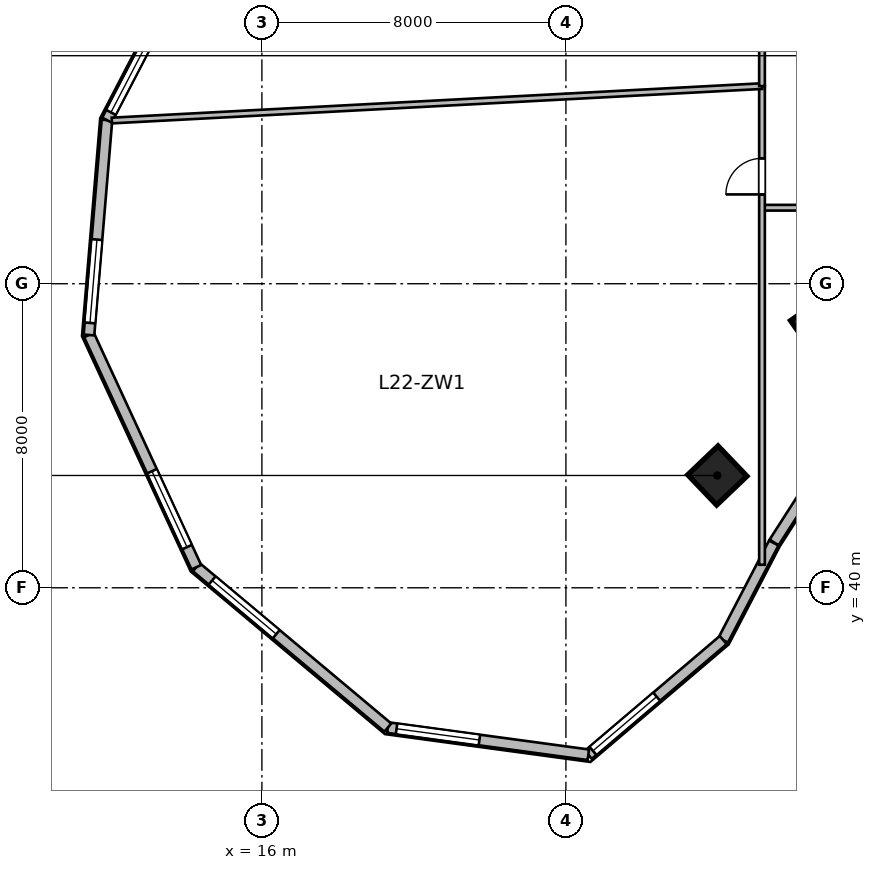
"""IFC4 building model, lengths in metres.
Left out: names, types, materials, properties, quantities, classifications, styles, units other than length and angle.
Written with IfcOpenShell. Run it as: python <this file> out.ifc"""

import sys

from ifc_helpers import new_model, si_unit, direction, frame, frame_2d, origin, origin_2d, place, context, subcontext, project, spatial, rectangle, extrude, source, transform, mapped, element, fill, save


model = new_model("IFC4")
c1 = context("Model", 3, precision=1e-05, world=origin(), true_north=direction((0.0, 1.0)))
c2 = subcontext(c1, "Body", "Model", "MODEL_VIEW")
j1 = project(units=[si_unit("LENGTHUNIT", "METRE"), si_unit("PLANEANGLEUNIT", "RADIAN")], contexts=[c1])
p1 = place(None, origin())
s1 = spatial("IfcSite", under=j1, at=p1, CompositionType="ELEMENT")
p2 = place(p1, origin())
s2 = spatial("IfcBuilding", under=s1, at=p2, CompositionType="ELEMENT")
p3 = place(p2, frame((0.0, 0.0, 96.0)))
s3 = spatial("IfcBuildingStorey", under=s2, at=p3, CompositionType="ELEMENT", Elevation=96.0)
m1 = source(origin(), c2, "Body", "SweptSolid", [
    extrude(rectangle(XDim=1.1, YDim=1.1, at=origin_2d()), origin(), (0.0, 0.0, 1.0), 3.9),
])
for number, where, z_axis, x_axis in (
    (1, (27.985, 42.955, 0.0), (0.0, 0.0, 1.0), (-0.691, 0.723, 0.0)),
    (2, (30.677, 46.892, 0.0), (0.0, 0.0, 1.0), (-0.571, 0.821, 0.0)),
):
    element("IfcColumn", number, at=place(p3, frame(where, z_axis=z_axis, x_axis=x_axis)), inside=s3, PredefinedType="COLUMN", context=c2, shape_type="MappedRepresentation", body=[
        mapped(m1, transform((0.0, 0.0, 0.0), scale=1.0)),
    ])
m2 = source(origin(), c2, "Body", "SweptSolid", [
    extrude(rectangle(XDim=2.84, YDim=0.28, at=frame_2d((1.42, 0.0))), origin(), (0.0, 0.0, 1.0), 3.65),
])
p4 = place(p3, frame((31.011, 43.582, 0.0), z_axis=(0.0, 0.0, 1.0), x_axis=(-0.540214368057, -0.841527442538, 0.0)))
e3 = element("IfcWall", 3, at=p4, inside=s3, PredefinedType="SOLIDWALL", context=c2, shape_type="MappedRepresentation", body=[
    mapped(m2, transform((0.0, 0.0, 0.0), scale=1.0)),
])
m3 = source(origin(), c2, "Body", "SweptSolid", [
    extrude(rectangle(XDim=2.88, YDim=0.28, at=frame_2d((1.44, 0.0))), origin(), (0.0, 0.0, 1.0), 3.65),
])
p5 = place(p3, frame((29.469, 41.178, 0.0), z_axis=(0.0, 0.0, 1.0), x_axis=(-0.461769086658, -0.887000175088, 0.0)))
e4 = element("IfcWall", 4, at=p5, inside=s3, PredefinedType="SOLIDWALL", context=c2, shape_type="MappedRepresentation", body=[
    mapped(m3, transform((0.0, 0.0, 0.0), scale=1.0)),
])
m4 = source(origin(), c2, "Body", "SweptSolid", [
    extrude(rectangle(XDim=4.659, YDim=0.28, at=frame_2d((2.33, 0.0))), origin(), (0.0, 0.0, 1.0), 3.65),
])
p6 = place(p3, frame((28.139, 38.624, 0.0), z_axis=(0.0, 0.0, 1.0), x_axis=(-0.761913458795, -0.647678841176, 0.0)))
e5 = element("IfcWall", 5, at=p6, inside=s3, PredefinedType="SOLIDWALL", context=c2, shape_type="MappedRepresentation", body=[
    mapped(m4, transform((0.0, 0.0, 0.0), scale=1.0)),
])
p7 = place(p6, frame((2.299, 0.0, 0.95)))
e6 = element("IfcOpeningElement", 6, at=p7, cuts=e5, PredefinedType="OPENING", context=c2, shape_type="SweptSolid", body=[
    extrude(rectangle(XDim=2.2, YDim=2.1, at=frame_2d((1.1, 1.05))), frame((0.0, 0.15, 0.0), z_axis=(0.0, -1.0, 0.0), x_axis=(1.0, 0.0, 0.0)), (0.0, 0.0, 1.0), 0.3),
])
m5 = source(origin(), c2, "Body", "SweptSolid", [
    extrude(rectangle(XDim=5.324, YDim=0.28, at=frame_2d((2.662, 0.0))), origin(), (0.0, 0.0, 1.0), 3.65),
])
p8 = place(p3, frame((24.59, 35.606, 0.0), z_axis=(0.0, 0.0, 1.0), x_axis=(-0.990931467223, 0.134368252451, 0.0)))
e7 = element("IfcWall", 7, at=p8, inside=s3, PredefinedType="SOLIDWALL", context=c2, shape_type="MappedRepresentation", body=[
    mapped(m5, transform((0.0, 0.0, 0.0), scale=1.0)),
])
p9 = place(p8, frame((2.893, 0.0, 0.95)))
e8 = element("IfcOpeningElement", 8, at=p9, cuts=e7, PredefinedType="OPENING", context=c2, shape_type="SweptSolid", body=[
    extrude(rectangle(XDim=2.2, YDim=2.1, at=frame_2d((1.1, 1.05))), frame((0.0, 0.15, 0.0), z_axis=(0.0, -1.0, 0.0), x_axis=(1.0, 0.0, 0.0)), (0.0, 0.0, 1.0), 0.3),
])
m6 = source(origin(), c2, "Body", "SweptSolid", [
    extrude(rectangle(XDim=6.573, YDim=0.28, at=frame_2d((3.287, 0.0))), origin(), (0.0, 0.0, 1.0), 3.65),
])
p10 = place(p3, frame((19.314, 36.322, 0.0), z_axis=(0.0, 0.0, 1.0), x_axis=(-0.766715154163, 0.641987439423, 0.0)))
e9 = element("IfcWall", 9, at=p10, inside=s3, PredefinedType="SOLIDWALL", context=c2, shape_type="MappedRepresentation", body=[
    mapped(m6, transform((0.0, 0.0, 0.0), scale=1.0)),
])
p11 = place(p10, frame((3.83, 0.0, 0.95)))
e10 = element("IfcOpeningElement", 10, at=p11, cuts=e9, PredefinedType="OPENING", context=c2, shape_type="SweptSolid", body=[
    extrude(rectangle(XDim=2.2, YDim=2.1, at=frame_2d((1.1, 1.05))), frame((0.0, 0.15, 0.0), z_axis=(0.0, -1.0, 0.0), x_axis=(1.0, 0.0, 0.0)), (0.0, 0.0, 1.0), 0.3),
])
m7 = source(origin(), c2, "Body", "SweptSolid", [
    extrude(rectangle(XDim=6.732, YDim=0.28, at=frame_2d((3.366, 0.0))), origin(), (0.0, 0.0, 1.0), 3.65),
])
p12 = place(p3, frame((14.275, 40.541, 0.0), z_axis=(0.0, 0.0, 1.0), x_axis=(-0.419644552709, 0.907688520023, 0.0)))
e11 = element("IfcWall", 11, at=p12, inside=s3, PredefinedType="SOLIDWALL", context=c2, shape_type="MappedRepresentation", body=[
    mapped(m7, transform((0.0, 0.0, 0.0), scale=1.0)),
])
p13 = place(p12, frame((0.583, 0.0, 0.95)))
e12 = element("IfcOpeningElement", 12, at=p13, cuts=e11, PredefinedType="OPENING", context=c2, shape_type="SweptSolid", body=[
    extrude(rectangle(XDim=2.2, YDim=2.1, at=frame_2d((1.1, 1.05))), frame((0.0, 0.15, 0.0), z_axis=(0.0, -1.0, 0.0), x_axis=(1.0, 0.0, 0.0)), (0.0, 0.0, 1.0), 0.3),
])
m8 = source(origin(), c2, "Body", "SweptSolid", [
    extrude(rectangle(XDim=5.674, YDim=0.28, at=frame_2d((2.837, 0.0))), origin(), (0.0, 0.0, 1.0), 3.65),
])
p14 = place(p3, frame((11.45, 46.652, 0.0), z_axis=(0.0, 0.0, 1.0), x_axis=(0.083309007867, 0.996523762491, 0.0)))
e13 = element("IfcWall", 13, at=p14, inside=s3, PredefinedType="SOLIDWALL", context=c2, shape_type="MappedRepresentation", body=[
    mapped(m8, transform((0.0, 0.0, 0.0), scale=1.0)),
])
p15 = place(p14, frame((0.318, 0.0, 0.95)))
e14 = element("IfcOpeningElement", 14, at=p15, cuts=e13, PredefinedType="OPENING", context=c2, shape_type="SweptSolid", body=[
    extrude(rectangle(XDim=2.2, YDim=2.1, at=frame_2d((1.1, 1.05))), frame((0.0, 0.15, 0.0), z_axis=(0.0, -1.0, 0.0), x_axis=(1.0, 0.0, 0.0)), (0.0, 0.0, 1.0), 0.3),
])
m9 = source(origin(), c2, "Body", "SweptSolid", [
    extrude(rectangle(XDim=5.315, YDim=0.28, at=frame_2d((2.658, 0.0))), origin(), (0.0, 0.0, 1.0), 3.65),
])
p16 = place(p3, frame((11.922, 52.305, 0.0), z_axis=(0.0, 0.0, 1.0), x_axis=(0.461760527822, 0.887004630735, 0.0)))
e15 = element("IfcWall", 15, at=p16, inside=s3, PredefinedType="SOLIDWALL", context=c2, shape_type="MappedRepresentation", body=[
    mapped(m9, transform((0.0, 0.0, 0.0), scale=1.0)),
])
p17 = place(p16, frame((0.229, 0.0, 0.95)))
e16 = element("IfcOpeningElement", 16, at=p17, cuts=e15, PredefinedType="OPENING", context=c2, shape_type="SweptSolid", body=[
    extrude(rectangle(XDim=2.2, YDim=2.1, at=frame_2d((1.1, 1.05))), frame((0.0, 0.15, 0.0), z_axis=(0.0, -1.0, 0.0), x_axis=(1.0, 0.0, 0.0)), (0.0, 0.0, 1.0), 0.3),
])
m10 = source(origin(), c2, "Body", "SweptSolid", [
    extrude(rectangle(XDim=2.5, YDim=0.15, at=frame_2d((1.25, 0.0))), origin(), (0.0, 0.0, 1.0), 3.65),
])
p18 = place(p3, frame((29.2, 50.0, 0.0), z_axis=(0.0, 0.0, 1.0), x_axis=(1.0, 0.0, 0.0)))
e17 = element("IfcWall", 17, at=p18, inside=s3, PredefinedType="PARTITIONING", context=c2, shape_type="MappedRepresentation", body=[
    mapped(m10, transform((0.0, 0.0, 0.0), scale=1.0)),
])
m11 = source(origin(), c2, "Body", "SweptSolid", [
    extrude(rectangle(XDim=12.594, YDim=0.15, at=frame_2d((6.297, 0.0))), origin(), (0.0, 0.0, 1.0), 2.942),
])
p19 = place(p3, frame((29.16, 40.606, 0.0), z_axis=(0.0, 0.0, 1.0), x_axis=(0.0, 1.0, 0.0)))
e18 = element("IfcWall", 18, at=p19, inside=s3, PredefinedType="PARTITIONING", context=c2, shape_type="MappedRepresentation", body=[
    mapped(m11, transform((0.0, 0.0, 0.0), scale=1.0)),
])
p20 = place(p19, frame((9.744, 0.0, 0.0)))
e19 = element("IfcOpeningElement", 19, at=p20, cuts=e18, PredefinedType="OPENING", context=c2, shape_type="SweptSolid", body=[
    extrude(rectangle(XDim=0.95, YDim=2.1, at=frame_2d((0.475, 1.05))), frame((0.0, 0.085, 0.0), z_axis=(0.0, -1.0, 0.0), x_axis=(1.0, 0.0, 0.0)), (0.0, 0.0, 1.0), 0.17),
])
m12 = source(origin(), c2, "Body", "SweptSolid", [
    extrude(rectangle(XDim=17.132, YDim=0.15, at=frame_2d((8.566, 0.0))), origin(), (0.0, 0.0, 1.0), 3.65),
])
p21 = place(p3, frame((12.052, 52.294, 0.0), z_axis=(0.0, 0.0, 1.0), x_axis=(0.998601444231, 0.05286923094, 0.0)))
e20 = element("IfcWall", 20, at=p21, inside=s3, PredefinedType="PARTITIONING", context=c2, shape_type="MappedRepresentation", body=[
    mapped(m12, transform((0.0, 0.0, 0.0), scale=1.0)),
])
m13 = source(origin(), c2, "Body", "SweptSolid", [
    extrude(rectangle(XDim=5.4, YDim=0.15, at=frame_2d((2.7, 0.0))), origin(), (0.0, 0.0, 1.0), 3.022),
])
p22 = place(p3, frame((29.16, 53.2, 0.0), z_axis=(0.0, 0.0, 1.0), x_axis=(0.0, 1.0, 0.0)))
e21 = element("IfcWall", 21, at=p22, inside=s3, PredefinedType="PARTITIONING", context=c2, shape_type="MappedRepresentation", body=[
    mapped(m13, transform((0.0, 0.0, 0.0), scale=1.0)),
])
p23 = place(p22, frame((2.225, 0.0, 0.0)))
e22 = element("IfcOpeningElement", 22, at=p23, cuts=e21, PredefinedType="OPENING", context=c2, shape_type="SweptSolid", body=[
    extrude(rectangle(XDim=0.95, YDim=2.1, at=frame_2d((0.475, 1.05))), frame((0.0, 0.085, 0.0), z_axis=(0.0, -1.0, 0.0), x_axis=(1.0, 0.0, 0.0)), (0.0, 0.0, 1.0), 0.17),
])
m14 = source(origin(), c2, "Body", "SweptSolid", [
    extrude(rectangle(XDim=2.2, YDim=2.1, at=frame_2d((1.1, 1.05))), frame((0.0, 0.03, 0.0), z_axis=(0.0, -1.0, 0.0), x_axis=(1.0, 0.0, 0.0)), (0.0, 0.0, 1.0), 0.06),
])
p24 = place(p7, origin())
e23 = element("IfcWindow", 23, at=p24, inside=s3, PartitioningType="TRIPLE_PANEL_VERTICAL", PredefinedType="WINDOW", context=c2, shape_type="MappedRepresentation", body=[
    mapped(m14, transform((0.0, 0.0, 0.0), scale=1.0)),
])
fill(e6, e23)
p25 = place(p9, origin())
e24 = element("IfcWindow", 24, at=p25, inside=s3, PartitioningType="TRIPLE_PANEL_VERTICAL", PredefinedType="WINDOW", context=c2, shape_type="MappedRepresentation", body=[
    mapped(m14, transform((0.0, 0.0, 0.0), scale=1.0)),
])
fill(e8, e24)
p26 = place(p11, origin())
e25 = element("IfcWindow", 25, at=p26, inside=s3, PartitioningType="TRIPLE_PANEL_VERTICAL", PredefinedType="WINDOW", context=c2, shape_type="MappedRepresentation", body=[
    mapped(m14, transform((0.0, 0.0, 0.0), scale=1.0)),
])
fill(e10, e25)
p27 = place(p13, origin())
e26 = element("IfcWindow", 26, at=p27, inside=s3, PartitioningType="TRIPLE_PANEL_VERTICAL", PredefinedType="WINDOW", context=c2, shape_type="MappedRepresentation", body=[
    mapped(m14, transform((0.0, 0.0, 0.0), scale=1.0)),
])
fill(e12, e26)
p28 = place(p15, origin())
e27 = element("IfcWindow", 27, at=p28, inside=s3, PartitioningType="TRIPLE_PANEL_VERTICAL", PredefinedType="WINDOW", context=c2, shape_type="MappedRepresentation", body=[
    mapped(m14, transform((0.0, 0.0, 0.0), scale=1.0)),
])
fill(e14, e27)
p29 = place(p17, origin())
e28 = element("IfcWindow", 28, at=p29, inside=s3, PartitioningType="TRIPLE_PANEL_VERTICAL", PredefinedType="WINDOW", context=c2, shape_type="MappedRepresentation", body=[
    mapped(m14, transform((0.0, 0.0, 0.0), scale=1.0)),
])
fill(e16, e28)
m15 = source(origin(), c2, "Body", "SweptSolid", [
    extrude(rectangle(XDim=0.95, YDim=2.1, at=frame_2d((0.475, 1.05))), frame((0.0, 0.025, 0.0), z_axis=(0.0, -1.0, 0.0), x_axis=(1.0, 0.0, 0.0)), (0.0, 0.0, 1.0), 0.05),
])
p30 = place(p20, origin())
e29 = element("IfcDoor", 29, at=p30, inside=s3, OperationType="SINGLE_SWING_LEFT", PredefinedType="DOOR", context=c2, shape_type="MappedRepresentation", body=[
    mapped(m15, transform((0.0, 0.0, 0.0), scale=1.0)),
])
fill(e19, e29)
save(model, sys.argv[1])
